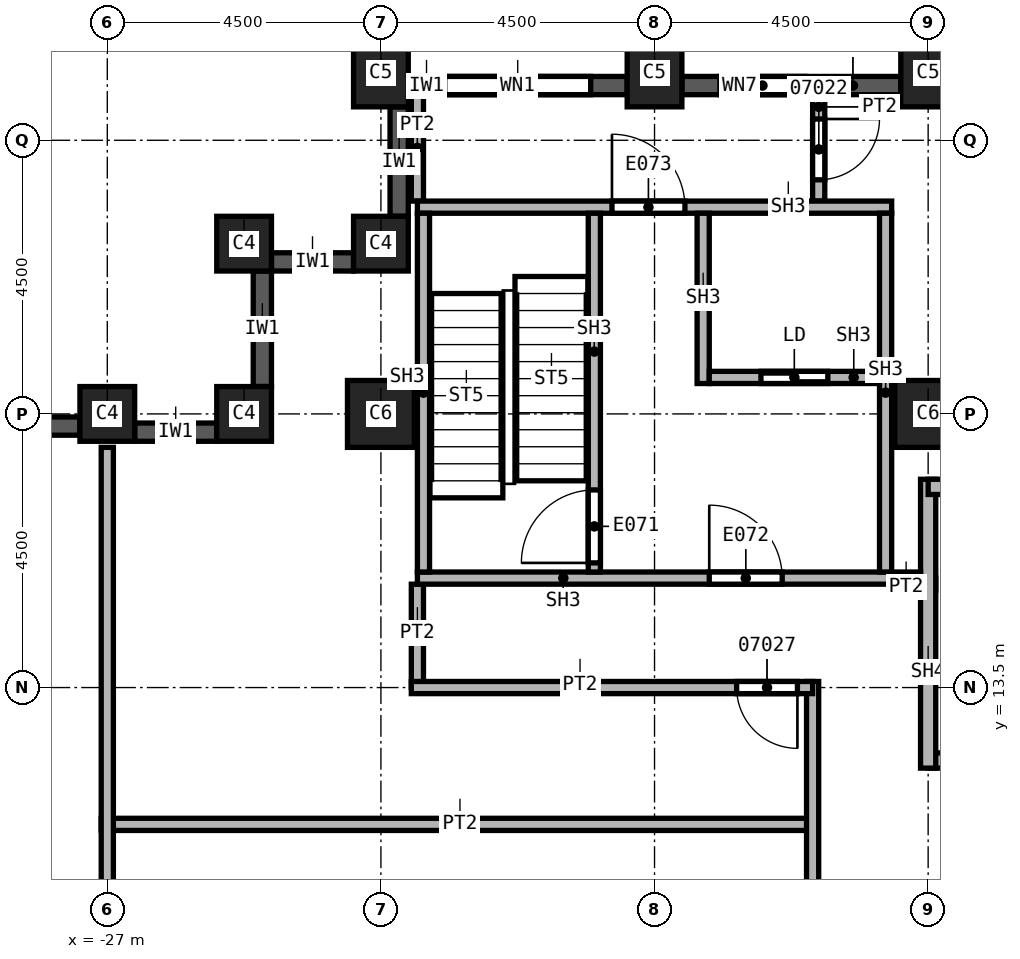
"""IFC4 building model, lengths in metres.
Left out: names, types, materials, properties, quantities, classifications, styles, units other than length and angle.
Written with IfcOpenShell. Run it as: python <this file> out.ifc"""

import sys

from ifc_helpers import new_model, si_unit, direction, frame, frame_2d, origin, origin_2d, place, context, subcontext, project, spatial, rectangle, extrude, element, fill, save


model = new_model("IFC4")
c1 = context("Model", 3, precision=1e-05, world=origin(), true_north=direction((0.0, 1.0)))
c2 = subcontext(c1, "Body", "Model", "MODEL_VIEW")
j1 = project(units=[si_unit("LENGTHUNIT", "METRE"), si_unit("PLANEANGLEUNIT", "RADIAN")], contexts=[c1])
p1 = place(None, origin())
s1 = spatial("IfcSite", under=j1, at=p1, CompositionType="ELEMENT")
p2 = place(p1, origin())
s2 = spatial("IfcBuilding", under=s1, at=p2, CompositionType="ELEMENT")
p3 = place(p2, frame((0.0, 0.0, 138.0)))
s3 = spatial("IfcBuildingStorey", under=s2, at=p3, CompositionType="ELEMENT", Elevation=138.0)
for number, where, z_axis, x_axis in (
    (1, (-13.5, 18.0, 0.0), (0.0, 0.0, 1.0), (1.0, 0.0, 0.0)),
    (2, (-22.5, 18.0, 0.0), (0.0, 0.0, 1.0), (1.0, 0.0, 0.0)),
):
    element("IfcColumn", number, at=place(p3, frame(where, z_axis=z_axis, x_axis=x_axis)), inside=s3, PredefinedType="COLUMN", context=c2, shape_type="SweptSolid", body=[
        extrude(rectangle(XDim=1.1, YDim=1.1, at=origin_2d()), origin(), (0.0, 0.0, 1.0), 3.7),
    ])
for number, where, z_axis, x_axis in (
    (3, (-13.5, 23.6, 0.0), (0.0, 0.0, 1.0), (1.0, 0.0, 0.0)),
    (4, (-18.0, 23.6, 0.0), (0.0, 0.0, 1.0), (1.0, 0.0, 0.0)),
    (5, (-22.5, 23.6, 0.0), (0.0, 0.0, 1.0), (1.0, 0.0, 0.0)),
):
    element("IfcColumn", number, at=place(p3, frame(where, z_axis=z_axis, x_axis=x_axis)), inside=s3, PredefinedType="COLUMN", context=c2, shape_type="SweptSolid", body=[
        extrude(rectangle(XDim=0.9, YDim=1.1, at=origin_2d()), origin(), (0.0, 0.0, 1.0), 3.7),
    ])
for number, where, z_axis, x_axis in (
    (6, (-27.0, 18.0, 0.0), (0.0, 0.0, 1.0), (1.0, 0.0, 0.0)),
    (7, (-22.5, 20.8, 0.0), (0.0, 0.0, 1.0), (1.0, 0.0, 0.0)),
    (8, (-24.75, 20.8, 0.0), (0.0, 0.0, 1.0), (1.0, 0.0, 0.0)),
    (9, (-24.75, 18.0, 0.0), (0.0, 0.0, 1.0), (1.0, 0.0, 0.0)),
):
    element("IfcColumn", number, at=place(p3, frame(where, z_axis=z_axis, x_axis=x_axis)), inside=s3, PredefinedType="COLUMN", context=c2, shape_type="SweptSolid", body=[
        extrude(rectangle(XDim=0.9, YDim=0.9, at=origin_2d()), origin(), (0.0, 0.0, 1.0), 3.7),
    ])
p4 = place(p3, frame((-22.2, 23.05, 0.0), z_axis=(0.0, 0.0, 1.0), x_axis=(0.0, -1.0, 0.0)))
e10 = element("IfcWall", 10, at=p4, inside=s3, PredefinedType="SOLIDWALL", context=c2, shape_type="SweptSolid", body=[
    extrude(rectangle(XDim=1.8, YDim=0.3, at=frame_2d((0.9, 0.0))), origin(), (0.0, 0.0, 1.0), 3.1),
])
p5 = place(p3, frame((-22.95, 20.5, 0.0), z_axis=(0.0, 0.0, 1.0), x_axis=(-1.0, 0.0, 0.0)))
e11 = element("IfcWall", 11, at=p5, inside=s3, PredefinedType="SOLIDWALL", context=c2, shape_type="SweptSolid", body=[
    extrude(rectangle(XDim=1.35, YDim=0.3, at=frame_2d((0.675, 0.0))), origin(), (0.0, 0.0, 1.0), 3.1),
])
p6 = place(p3, frame((-24.45, 20.35, 0.0), z_axis=(0.0, 0.0, 1.0), x_axis=(0.0, -1.0, 0.0)))
e12 = element("IfcWall", 12, at=p6, inside=s3, PredefinedType="SOLIDWALL", context=c2, shape_type="SweptSolid", body=[
    extrude(rectangle(XDim=1.9, YDim=0.3, at=frame_2d((0.95, 0.0))), origin(), (0.0, 0.0, 1.0), 3.1),
])
p7 = place(p3, frame((-25.2, 17.7, 0.0), z_axis=(0.0, 0.0, 1.0), x_axis=(-1.0, 0.0, 0.0)))
e13 = element("IfcWall", 13, at=p7, inside=s3, PredefinedType="SOLIDWALL", context=c2, shape_type="SweptSolid", body=[
    extrude(rectangle(XDim=1.35, YDim=0.3, at=frame_2d((0.675, 0.0))), origin(), (0.0, 0.0, 1.0), 3.1),
])
p8 = place(p3, frame((-27.45, 17.8, 0.0), z_axis=(0.0, 0.0, 1.0), x_axis=(-1.0, 0.0, 0.0)))
e14 = element("IfcWall", 14, at=p8, inside=s3, PredefinedType="SOLIDWALL", context=c2, shape_type="SweptSolid", body=[
    extrude(rectangle(XDim=3.6, YDim=0.3, at=frame_2d((1.8, 0.0))), origin(), (0.0, 0.0, 1.0), 3.1),
])
p9 = place(p8, frame((0.6, 0.0, 0.8)))
e15 = element("IfcOpeningElement", 15, at=p9, cuts=e14, PredefinedType="OPENING", context=c2, shape_type="SweptSolid", body=[
    extrude(rectangle(XDim=2.4, YDim=1.95, at=frame_2d((1.2, 0.975))), frame((0.0, 0.15, 0.0), z_axis=(0.0, -1.0, 0.0), x_axis=(1.0, 0.0, 0.0)), (0.0, 0.0, 1.0), 0.3),
])
p10 = place(p3, frame((-13.95, 23.4, 0.0), z_axis=(0.0, 0.0, 1.0), x_axis=(-1.0, 0.0, 0.0)))
e16 = element("IfcWall", 16, at=p10, inside=s3, PredefinedType="SOLIDWALL", context=c2, shape_type="SweptSolid", body=[
    extrude(rectangle(XDim=3.6, YDim=0.3, at=frame_2d((1.8, 0.0))), origin(), (0.0, 0.0, 1.0), 3.1),
])
p11 = place(p10, frame((1.575, 0.0, 0.8)))
e17 = element("IfcOpeningElement", 17, at=p11, cuts=e16, PredefinedType="OPENING", context=c2, shape_type="SweptSolid", body=[
    extrude(rectangle(XDim=1.4, YDim=1.95, at=frame_2d((0.7, 0.975))), frame((0.0, 0.15, 0.0), z_axis=(0.0, -1.0, 0.0), x_axis=(1.0, 0.0, 0.0)), (0.0, 0.0, 1.0), 0.3),
])
p12 = place(p3, frame((-18.45, 23.4, 0.0), z_axis=(0.0, 0.0, 1.0), x_axis=(-1.0, 0.0, 0.0)))
e18 = element("IfcWall", 18, at=p12, inside=s3, PredefinedType="SOLIDWALL", context=c2, shape_type="SweptSolid", body=[
    extrude(rectangle(XDim=3.6, YDim=0.3, at=frame_2d((1.8, 0.0))), origin(), (0.0, 0.0, 1.0), 3.1),
])
p13 = place(p12, frame((0.6, 0.0, 0.8)))
e19 = element("IfcOpeningElement", 19, at=p13, cuts=e18, PredefinedType="OPENING", context=c2, shape_type="SweptSolid", body=[
    extrude(rectangle(XDim=2.4, YDim=1.95, at=frame_2d((1.2, 0.975))), frame((0.0, 0.15, 0.0), z_axis=(0.0, -1.0, 0.0), x_axis=(1.0, 0.0, 0.0)), (0.0, 0.0, 1.0), 0.3),
])
p14 = place(p3, frame((-27.1, 11.25, 0.0), z_axis=(0.0, 0.0, 1.0), x_axis=(1.0, 0.0, 0.0)))
e20 = element("IfcWall", 20, at=p14, inside=s3, PredefinedType="PARTITIONING", context=c2, shape_type="SweptSolid", body=[
    extrude(rectangle(XDim=11.7, YDim=0.2, at=frame_2d((5.85, 0.0))), origin(), (0.0, 0.0, 1.0), 3.7),
])
p15 = place(p3, frame((-27.0, 3.75, 0.0), z_axis=(0.0, 0.0, 1.0), x_axis=(0.0, 1.0, 0.0)))
e21 = element("IfcWall", 21, at=p15, inside=s3, PredefinedType="PARTITIONING", context=c2, shape_type="SweptSolid", body=[
    extrude(rectangle(XDim=13.7, YDim=0.2, at=frame_2d((6.85, 0.0))), origin(), (0.0, 0.0, 1.0), 3.7),
])
p16 = place(p3, frame((-21.9, 13.5, 0.0), z_axis=(0.0, 0.0, 1.0), x_axis=(0.0, 1.0, 0.0)))
e22 = element("IfcWall", 22, at=p16, inside=s3, PredefinedType="PARTITIONING", context=c2, shape_type="SweptSolid", body=[
    extrude(rectangle(XDim=1.7, YDim=0.2, at=frame_2d((0.85, 0.0))), origin(), (0.0, 0.0, 1.0), 3.7),
])
p17 = place(p3, frame((-21.9, 21.5, 0.0), z_axis=(0.0, 0.0, 1.0), x_axis=(0.0, 1.0, 0.0)))
e23 = element("IfcWall", 23, at=p17, inside=s3, PredefinedType="PARTITIONING", context=c2, shape_type="SweptSolid", body=[
    extrude(rectangle(XDim=1.75, YDim=0.2, at=frame_2d((0.875, 0.0))), origin(), (0.0, 0.0, 1.0), 3.7),
])
p18 = place(p3, frame((-15.4, 3.65, 0.0), z_axis=(0.0, 0.0, 1.0), x_axis=(0.0, 1.0, 0.0)))
e24 = element("IfcWall", 24, at=p18, inside=s3, PredefinedType="PARTITIONING", context=c2, shape_type="SweptSolid", body=[
    extrude(rectangle(XDim=9.95, YDim=0.2, at=frame_2d((4.975, 0.0))), origin(), (0.0, 0.0, 1.0), 3.7),
])
p19 = place(p3, frame((-15.4, 13.5, 0.0), z_axis=(0.0, 0.0, 1.0), x_axis=(-1.0, 0.0, 0.0)))
e25 = element("IfcWall", 25, at=p19, inside=s3, PredefinedType="PARTITIONING", context=c2, shape_type="SweptSolid", body=[
    extrude(rectangle(XDim=6.6, YDim=0.2, at=frame_2d((3.3, 0.0))), origin(), (0.0, 0.0, 1.0), 3.7),
])
p20 = place(p19, frame((0.25, 0.0, 0.0)))
e26 = element("IfcOpeningElement", 26, at=p20, cuts=e25, PredefinedType="OPENING", context=c2, shape_type="SweptSolid", body=[
    extrude(rectangle(XDim=1.0, YDim=2.1, at=frame_2d((0.5, 1.05))), frame((0.0, 0.1, 0.0), z_axis=(0.0, -1.0, 0.0), x_axis=(1.0, 0.0, 0.0)), (0.0, 0.0, 1.0), 0.2),
])
p21 = place(p3, frame((-15.3, 23.25, 0.0), z_axis=(0.0, 0.0, 1.0), x_axis=(0.0, -1.0, 0.0)))
e27 = element("IfcWall", 27, at=p21, inside=s3, PredefinedType="PARTITIONING", context=c2, shape_type="SweptSolid", body=[
    extrude(rectangle(XDim=1.75, YDim=0.2, at=frame_2d((0.875, 0.0))), origin(), (0.0, 0.0, 1.0), 3.7),
])
p22 = place(p21, frame((0.4, 0.0, 0.0)))
e28 = element("IfcOpeningElement", 28, at=p22, cuts=e27, PredefinedType="OPENING", context=c2, shape_type="SweptSolid", body=[
    extrude(rectangle(XDim=1.0, YDim=2.1, at=frame_2d((0.5, 1.05))), frame((0.0, 0.1, 0.0), z_axis=(0.0, -1.0, 0.0), x_axis=(1.0, 0.0, 0.0)), (0.0, 0.0, 1.0), 0.2),
])
p23 = place(p3, frame((-14.1, 15.2, 0.0), z_axis=(0.0, 0.0, 1.0), x_axis=(1.0, 0.0, 0.0)))
e29 = element("IfcWall", 29, at=p23, inside=s3, PredefinedType="PARTITIONING", context=c2, shape_type="SweptSolid", body=[
    extrude(rectangle(XDim=0.725, YDim=0.2, at=frame_2d((0.363, 0.0))), origin(), (0.0, 0.0, 1.0), 3.7),
])
p24 = place(p3, frame((-13.5, 12.3, 0.0), z_axis=(0.0, 0.0, 1.0), x_axis=(1.0, 0.0, 0.0)))
e30 = element("IfcWall", 30, at=p24, inside=s3, PredefinedType="SOLIDWALL", context=c2, shape_type="SweptSolid", body=[
    extrude(rectangle(XDim=9.125, YDim=0.25, at=frame_2d((4.562, 0.0))), origin(), (0.0, 0.0, 1.0), 3.7),
])
p25 = place(p24, frame((0.6, 0.0, 0.0)))
e31 = element("IfcOpeningElement", 31, at=p25, cuts=e30, PredefinedType="OPENING", context=c2, shape_type="SweptSolid", body=[
    extrude(rectangle(XDim=1.2, YDim=2.1, at=frame_2d((0.6, 1.05))), frame((0.0, 0.125, 0.0), z_axis=(0.0, -1.0, 0.0), x_axis=(1.0, 0.0, 0.0)), (0.0, 0.0, 1.0), 0.25),
])
p26 = place(p3, frame((-13.5, 12.175, 0.0), z_axis=(0.0, 0.0, 1.0), x_axis=(0.0, 1.0, 0.0)))
e32 = element("IfcWall", 32, at=p26, inside=s3, PredefinedType="SOLIDWALL", context=c2, shape_type="SweptSolid", body=[
    extrude(rectangle(XDim=4.75, YDim=0.25, at=frame_2d((2.375, 0.0))), origin(), (0.0, 0.0, 1.0), 3.7),
])
p27 = place(p3, frame((-13.5, 16.8, 0.0), z_axis=(0.0, 0.0, 1.0), x_axis=(1.0, 0.0, 0.0)))
e33 = element("IfcWall", 33, at=p27, inside=s3, PredefinedType="SOLIDWALL", context=c2, shape_type="SweptSolid", body=[
    extrude(rectangle(XDim=9.125, YDim=0.25, at=frame_2d((4.562, 0.0))), origin(), (0.0, 0.0, 1.0), 3.7),
])
p28 = place(p3, frame((-21.9, 15.3, 0.0), z_axis=(0.0, 0.0, 1.0), x_axis=(1.0, 0.0, 0.0)))
e34 = element("IfcWall", 34, at=p28, inside=s3, PredefinedType="SOLIDWALL", context=c2, shape_type="SweptSolid", body=[
    extrude(rectangle(XDim=8.275, YDim=0.2, at=frame_2d((4.137, 0.0))), origin(), (0.0, 0.0, 1.0), 3.7),
])
p29 = place(p28, frame((4.8, 0.0, 0.0)))
e35 = element("IfcOpeningElement", 35, at=p29, cuts=e34, PredefinedType="OPENING", context=c2, shape_type="SweptSolid", body=[
    extrude(rectangle(XDim=1.2, YDim=2.1, at=frame_2d((0.6, 1.05))), frame((0.0, 0.1, 0.0), z_axis=(0.0, -1.0, 0.0), x_axis=(1.0, 0.0, 0.0)), (0.0, 0.0, 1.0), 0.2),
])
p30 = place(p3, frame((-21.9, 21.4, 0.0), z_axis=(0.0, 0.0, 1.0), x_axis=(1.0, 0.0, 0.0)))
e36 = element("IfcWall", 36, at=p30, inside=s3, PredefinedType="SOLIDWALL", context=c2, shape_type="SweptSolid", body=[
    extrude(rectangle(XDim=7.8, YDim=0.2, at=frame_2d((3.9, 0.0))), origin(), (0.0, 0.0, 1.0), 3.7),
])
p31 = place(p30, frame((3.2, 0.0, 0.0)))
e37 = element("IfcOpeningElement", 37, at=p31, cuts=e36, PredefinedType="OPENING", context=c2, shape_type="SweptSolid", body=[
    extrude(rectangle(XDim=1.2, YDim=2.1, at=frame_2d((0.6, 1.05))), frame((0.0, 0.1, 0.0), z_axis=(0.0, -1.0, 0.0), x_axis=(1.0, 0.0, 0.0)), (0.0, 0.0, 1.0), 0.2),
])
for number, where, z_axis, x_axis in (
    (38, (-21.8, 15.4, 0.0), (0.0, 0.0, 1.0), (0.0, 1.0, 0.0)),
    (39, (-14.2, 15.4, 0.0), (0.0, 0.0, 1.0), (0.0, 1.0, 0.0)),
):
    element("IfcWall", number, at=place(p3, frame(where, z_axis=z_axis, x_axis=x_axis)), inside=s3, PredefinedType="SOLIDWALL", context=c2, shape_type="SweptSolid", body=[
        extrude(rectangle(XDim=5.9, YDim=0.2, at=frame_2d((2.95, 0.0))), origin(), (0.0, 0.0, 1.0), 3.7),
    ])
p32 = place(p3, frame((-18.99, 15.4, 0.0), z_axis=(0.0, 0.0, 1.0), x_axis=(0.0, 1.0, 0.0)))
e40 = element("IfcWall", 40, at=p32, inside=s3, PredefinedType="SOLIDWALL", context=c2, shape_type="SweptSolid", body=[
    extrude(rectangle(XDim=5.9, YDim=0.2, at=frame_2d((2.95, 0.0))), origin(), (0.0, 0.0, 1.0), 3.7),
])
p33 = place(p32, frame((0.15, 0.0, 0.0)))
e41 = element("IfcOpeningElement", 41, at=p33, cuts=e40, PredefinedType="OPENING", context=c2, shape_type="SweptSolid", body=[
    extrude(rectangle(XDim=1.2, YDim=2.1, at=frame_2d((0.6, 1.05))), frame((0.0, 0.1, 0.0), z_axis=(0.0, -1.0, 0.0), x_axis=(1.0, 0.0, 0.0)), (0.0, 0.0, 1.0), 0.2),
])
p34 = place(p3, frame((-17.2, 18.5, 0.0), z_axis=(0.0, 0.0, 1.0), x_axis=(0.0, 1.0, 0.0)))
e42 = element("IfcWall", 42, at=p34, inside=s3, PredefinedType="SOLIDWALL", context=c2, shape_type="SweptSolid", body=[
    extrude(rectangle(XDim=2.8, YDim=0.2, at=frame_2d((1.4, 0.0))), origin(), (0.0, 0.0, 1.0), 3.7),
])
p35 = place(p3, frame((-17.1, 18.6, 0.0), z_axis=(0.0, 0.0, 1.0), x_axis=(1.0, 0.0, 0.0)))
e43 = element("IfcWall", 43, at=p35, inside=s3, PredefinedType="SOLIDWALL", context=c2, shape_type="SweptSolid", body=[
    extrude(rectangle(XDim=2.8, YDim=0.2, at=frame_2d((1.4, 0.0))), origin(), (0.0, 0.0, 1.0), 3.7),
])
p36 = place(p35, frame((0.85, 0.0, 0.0)))
e44 = element("IfcOpeningElement", 44, at=p36, cuts=e43, PredefinedType="OPENING", context=c2, shape_type="SweptSolid", body=[
    extrude(rectangle(XDim=1.1, YDim=2.1, at=frame_2d((0.55, 1.05))), frame((0.0, 0.1, 0.0), z_axis=(0.0, -1.0, 0.0), x_axis=(1.0, 0.0, 0.0)), (0.0, 0.0, 1.0), 0.2),
])
p37 = place(p13, origin())
e45 = element("IfcWindow", 45, at=p37, inside=s3, PartitioningType="SINGLE_PANEL", PredefinedType="WINDOW", context=c2, shape_type="SweptSolid", body=[
    extrude(rectangle(XDim=2.4, YDim=1.95, at=frame_2d((1.2, 0.975))), frame((0.0, 0.03, 0.0), z_axis=(0.0, -1.0, 0.0), x_axis=(1.0, 0.0, 0.0)), (0.0, 0.0, 1.0), 0.06),
])
fill(e19, e45)
p38 = place(p22, origin())
e46 = element("IfcDoor", 46, at=p38, inside=s3, OperationType="SINGLE_SWING_LEFT", PredefinedType="DOOR", context=c2, shape_type="SweptSolid", body=[
    extrude(rectangle(XDim=1.0, YDim=2.1, at=frame_2d((0.5, 1.05))), frame((0.0, 0.025, 0.0), z_axis=(0.0, -1.0, 0.0), x_axis=(1.0, 0.0, 0.0)), (0.0, 0.0, 1.0), 0.05),
])
fill(e28, e46)
p39 = place(p20, origin())
e47 = element("IfcDoor", 47, at=p39, inside=s3, OperationType="SINGLE_SWING_RIGHT", PredefinedType="DOOR", context=c2, shape_type="SweptSolid", body=[
    extrude(rectangle(XDim=1.0, YDim=2.1, at=frame_2d((0.5, 1.05))), frame((0.0, 0.025, 0.0), z_axis=(0.0, -1.0, 0.0), x_axis=(1.0, 0.0, 0.0)), (0.0, 0.0, 1.0), 0.05),
])
fill(e26, e47)
p40 = place(p33, origin())
e48 = element("IfcDoor", 48, at=p40, inside=s3, OperationType="SINGLE_SWING_LEFT", PredefinedType="DOOR", context=c2, shape_type="SweptSolid", body=[
    extrude(rectangle(XDim=1.2, YDim=2.1, at=frame_2d((0.6, 1.05))), frame((0.0, 0.025, 0.0), z_axis=(0.0, -1.0, 0.0), x_axis=(1.0, 0.0, 0.0)), (0.0, 0.0, 1.0), 0.05),
])
fill(e41, e48)
p41 = place(p36, origin())
e49 = element("IfcDoor", 49, at=p41, inside=s3, OperationType="SLIDING_TO_LEFT", PredefinedType="DOOR", context=c2, shape_type="SweptSolid", body=[
    extrude(rectangle(XDim=1.1, YDim=2.1, at=frame_2d((0.55, 1.05))), frame((0.0, 0.025, 0.0), z_axis=(0.0, -1.0, 0.0), x_axis=(1.0, 0.0, 0.0)), (0.0, 0.0, 1.0), 0.05),
])
fill(e44, e49)
p42 = place(p29, origin())
e50 = element("IfcDoor", 50, at=p42, inside=s3, OperationType="SINGLE_SWING_RIGHT", PredefinedType="DOOR", context=c2, shape_type="SweptSolid", body=[
    extrude(rectangle(XDim=1.2, YDim=2.1, at=frame_2d((0.6, 1.05))), frame((0.0, 0.025, 0.0), z_axis=(0.0, -1.0, 0.0), x_axis=(1.0, 0.0, 0.0)), (0.0, 0.0, 1.0), 0.05),
])
fill(e35, e50)
p43 = place(p31, origin())
e51 = element("IfcDoor", 51, at=p43, inside=s3, OperationType="SINGLE_SWING_LEFT", PredefinedType="DOOR", context=c2, shape_type="SweptSolid", body=[
    extrude(rectangle(XDim=1.2, YDim=2.1, at=frame_2d((0.6, 1.05))), frame((0.0, 0.025, 0.0), z_axis=(0.0, -1.0, 0.0), x_axis=(1.0, 0.0, 0.0)), (0.0, 0.0, 1.0), 0.05),
])
fill(e37, e51)
p44 = place(p11, origin())
e52 = element("IfcWindow", 52, at=p44, inside=s3, PartitioningType="SINGLE_PANEL", PredefinedType="WINDOW", context=c2, shape_type="SweptSolid", body=[
    extrude(rectangle(XDim=1.4, YDim=1.95, at=frame_2d((0.7, 0.975))), frame((0.0, 0.03, 0.0), z_axis=(0.0, -1.0, 0.0), x_axis=(1.0, 0.0, 0.0)), (0.0, 0.0, 1.0), 0.06),
])
fill(e17, e52)
save(model, sys.argv[1])
